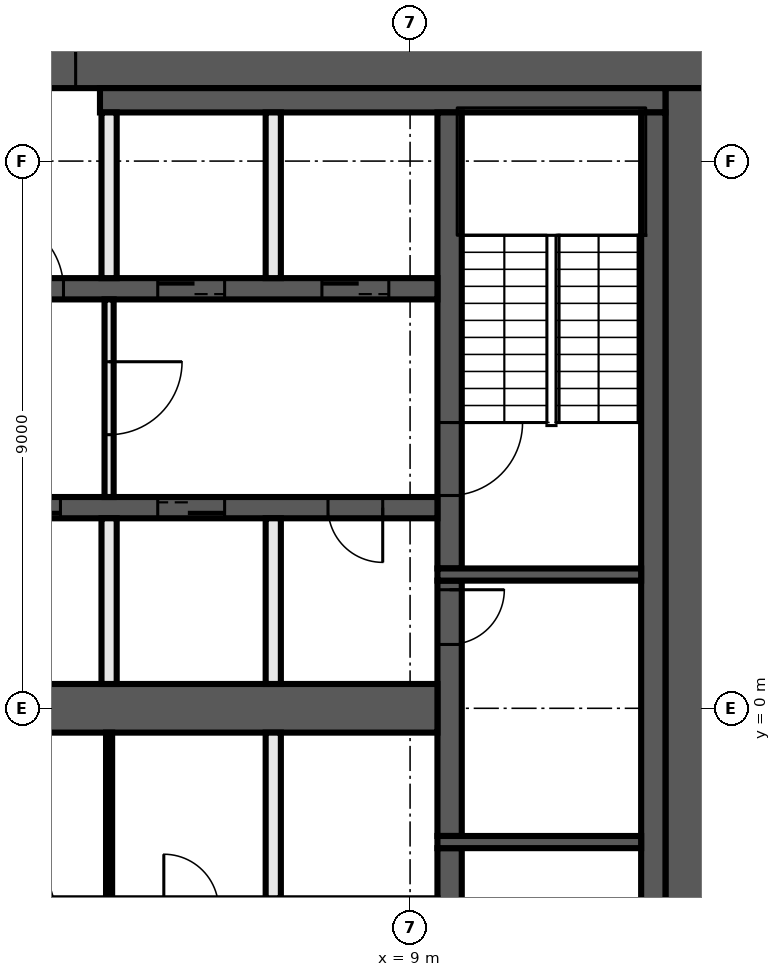
"""IFC4 building model, lengths in metres.
Left out: names, types, materials, properties, quantities, classifications, styles, units other than length and angle.
Written with IfcOpenShell. Run it as: python <this file> out.ifc"""

import sys

from ifc_helpers import new_model, si_unit, direction, frame, frame_2d, origin, place, context, subcontext, project, spatial, rectangle, extrude, element, fill, save


model = new_model("IFC4")
c1 = context("Model", 3, precision=1e-05, world=origin(), true_north=direction((0.0, 1.0)))
c2 = subcontext(c1, "Body", "Model", "MODEL_VIEW")
j1 = project(units=[si_unit("LENGTHUNIT", "METRE"), si_unit("PLANEANGLEUNIT", "RADIAN")], contexts=[c1])
p1 = place(None, origin())
s1 = spatial("IfcSite", under=j1, at=p1, CompositionType="ELEMENT")
p2 = place(p1, origin())
s2 = spatial("IfcBuilding", under=s1, at=p2, CompositionType="ELEMENT")
p3 = place(p2, frame((0.0, 0.0, 203.0)))
s3 = spatial("IfcBuildingStorey", under=s2, at=p3, CompositionType="ELEMENT", Elevation=203.0)
p4 = place(p3, frame((-14.0, 10.6, 0.0), z_axis=(0.0, 0.0, 1.0), x_axis=(1.0, 0.0, 0.0)))
e1 = element("IfcWall", 1, at=p4, inside=s3, PredefinedType="SHEAR", context=c2, shape_type="SweptSolid", body=[
    extrude(rectangle(XDim=28.0, YDim=0.8, at=frame_2d((14.0, 0.0))), origin(), (0.0, 0.0, 1.0), 3.82),
])
p5 = place(p4, frame((15.9, 0.0, 0.0)))
e2 = element("IfcOpeningElement", 2, at=p5, cuts=e1, PredefinedType="OPENING", context=c2, shape_type="SweptSolid", body=[
    extrude(rectangle(XDim=1.6, YDim=2.1, at=frame_2d((0.8, 1.05))), frame((0.0, 0.41, 0.0), z_axis=(0.0, -1.0, 0.0), x_axis=(1.0, 0.0, 0.0)), (0.0, 0.0, 1.0), 0.82),
])
p6 = place(p3, frame((13.6, 10.2, 0.0), z_axis=(0.0, 0.0, 1.0), x_axis=(0.0, -1.0, 0.0)))
e3 = element("IfcWall", 3, at=p6, inside=s3, PredefinedType="SHEAR", context=c2, shape_type="SweptSolid", body=[
    extrude(rectangle(XDim=20.4, YDim=0.8, at=frame_2d((10.2, 0.0))), origin(), (0.0, 0.0, 1.0), 3.82),
])
p7 = place(p3, frame((3.9, 10.0, 0.0), z_axis=(0.0, 0.0, 1.0), x_axis=(1.0, 0.0, 0.0)))
e4 = element("IfcWall", 4, at=p7, inside=s3, PredefinedType="SHEAR", context=c2, shape_type="SweptSolid", body=[
    extrude(rectangle(XDim=9.3, YDim=0.4, at=frame_2d((4.65, 0.0))), origin(), (0.0, 0.0, 1.0), 3.82),
])
p8 = place(p3, frame((13.0, 9.8, 0.0), z_axis=(0.0, 0.0, 1.0), x_axis=(0.0, -1.0, 0.0)))
e5 = element("IfcWall", 5, at=p8, inside=s3, PredefinedType="SHEAR", context=c2, shape_type="SweptSolid", body=[
    extrude(rectangle(XDim=19.6, YDim=0.4, at=frame_2d((9.8, 0.0))), origin(), (0.0, 0.0, 1.0), 3.82),
])
p9 = place(p3, frame((9.65, -2.3, 0.0), z_axis=(0.0, 0.0, 1.0), x_axis=(0.0, -1.0, 0.0)))
e6 = element("IfcWall", 6, at=p9, inside=s3, PredefinedType="SHEAR", context=c2, shape_type="SweptSolid", body=[
    extrude(rectangle(XDim=7.5, YDim=0.4, at=frame_2d((3.75, 0.0))), origin(), (0.0, 0.0, 1.0), 3.82),
])
p10 = place(p9, frame((1.2, 0.0, 0.0)))
e7 = element("IfcOpeningElement", 7, at=p10, cuts=e6, PredefinedType="OPENING", context=c2, shape_type="SweptSolid", body=[
    extrude(rectangle(XDim=1.2, YDim=2.1, at=frame_2d((0.6, 1.05))), frame((0.0, 0.21, 0.0), z_axis=(0.0, -1.0, 0.0), x_axis=(1.0, 0.0, 0.0)), (0.0, 0.0, 1.0), 0.42),
])
p11 = place(p3, frame((9.65, 2.1, 0.0), z_axis=(0.0, 0.0, 1.0), x_axis=(0.0, -1.0, 0.0)))
e8 = element("IfcWall", 8, at=p11, inside=s3, PredefinedType="SHEAR", context=c2, shape_type="SweptSolid", body=[
    extrude(rectangle(XDim=4.2, YDim=0.4, at=frame_2d((2.1, 0.0))), origin(), (0.0, 0.0, 1.0), 3.82),
])
p12 = place(p11, frame((0.15, 0.0, 0.0)))
e9 = element("IfcOpeningElement", 9, at=p12, cuts=e8, PredefinedType="OPENING", context=c2, shape_type="SweptSolid", body=[
    extrude(rectangle(XDim=0.9, YDim=2.1, at=frame_2d((0.45, 1.05))), frame((0.0, 0.21, 0.0), z_axis=(0.0, -1.0, 0.0), x_axis=(1.0, 0.0, 0.0)), (0.0, 0.0, 1.0), 0.42),
])
p13 = place(p3, frame((9.65, 9.8, 0.0), z_axis=(0.0, 0.0, 1.0), x_axis=(0.0, -1.0, 0.0)))
e10 = element("IfcWall", 10, at=p13, inside=s3, PredefinedType="SHEAR", context=c2, shape_type="SweptSolid", body=[
    extrude(rectangle(XDim=7.5, YDim=0.4, at=frame_2d((3.75, 0.0))), origin(), (0.0, 0.0, 1.0), 3.82),
])
p14 = place(p13, frame((5.1, 0.0, 0.0)))
e11 = element("IfcOpeningElement", 11, at=p14, cuts=e10, PredefinedType="OPENING", context=c2, shape_type="SweptSolid", body=[
    extrude(rectangle(XDim=1.2, YDim=2.1, at=frame_2d((0.6, 1.05))), frame((0.0, 0.21, 0.0), z_axis=(0.0, -1.0, 0.0), x_axis=(1.0, 0.0, 0.0)), (0.0, 0.0, 1.0), 0.42),
])
for number, where, z_axis, x_axis in (
    (12, (9.45, 2.2, 0.0), (0.0, 0.0, 1.0), (1.0, 0.0, 0.0)),
    (13, (9.45, -2.2, 0.0), (0.0, 0.0, 1.0), (1.0, 0.0, 0.0)),
):
    element("IfcWall", number, at=place(p3, frame(where, z_axis=z_axis, x_axis=x_axis)), inside=s3, PredefinedType="SHEAR", context=c2, shape_type="SweptSolid", body=[
        extrude(rectangle(XDim=3.35, YDim=0.2, at=frame_2d((1.675, 0.0))), origin(), (0.0, 0.0, 1.0), 3.82),
    ])
p15 = place(p3, frame((-9.45, 6.9, 0.0), z_axis=(0.0, 0.0, 1.0), x_axis=(1.0, 0.0, 0.0)))
e14 = element("IfcWall", 14, at=p15, inside=s3, PredefinedType="SHEAR", context=c2, shape_type="SweptSolid", body=[
    extrude(rectangle(XDim=18.9, YDim=0.35, at=frame_2d((9.45, 0.0))), origin(), (0.0, 0.0, 1.0), 3.82),
])
p16 = place(p15, frame((11.55, 0.0, 0.0)))
e15 = element("IfcOpeningElement", 15, at=p16, cuts=e14, PredefinedType="OPENING", context=c2, shape_type="SweptSolid", body=[
    extrude(rectangle(XDim=1.2, YDim=2.1, at=frame_2d((0.6, 1.05))), frame((0.0, 0.185, 0.0), z_axis=(0.0, -1.0, 0.0), x_axis=(1.0, 0.0, 0.0)), (0.0, 0.0, 1.0), 0.37),
])
p17 = place(p15, frame((14.3, 0.0, 0.0)))
e16 = element("IfcOpeningElement", 16, at=p17, cuts=e14, PredefinedType="OPENING", context=c2, shape_type="SweptSolid", body=[
    extrude(rectangle(XDim=1.1, YDim=2.1, at=frame_2d((0.55, 1.05))), frame((0.0, 0.185, 0.0), z_axis=(0.0, -1.0, 0.0), x_axis=(1.0, 0.0, 0.0)), (0.0, 0.0, 1.0), 0.37),
])
p18 = place(p15, frame((17.0, 0.0, 0.0)))
e17 = element("IfcOpeningElement", 17, at=p18, cuts=e14, PredefinedType="OPENING", context=c2, shape_type="SweptSolid", body=[
    extrude(rectangle(XDim=1.1, YDim=2.1, at=frame_2d((0.55, 1.05))), frame((0.0, 0.185, 0.0), z_axis=(0.0, -1.0, 0.0), x_axis=(1.0, 0.0, 0.0)), (0.0, 0.0, 1.0), 0.37),
])
p19 = place(p15, frame((0.9, 0.0, 0.0)))
e18 = element("IfcOpeningElement", 18, at=p19, cuts=e14, PredefinedType="OPENING", context=c2, shape_type="SweptSolid", body=[
    extrude(rectangle(XDim=0.9, YDim=2.1, at=frame_2d((0.45, 1.05))), frame((0.0, 0.185, 0.0), z_axis=(0.0, -1.0, 0.0), x_axis=(1.0, 0.0, 0.0)), (0.0, 0.0, 1.0), 0.37),
])
p20 = place(p15, frame((4.95, 0.0, 0.0)))
e19 = element("IfcOpeningElement", 19, at=p20, cuts=e14, PredefinedType="OPENING", context=c2, shape_type="SweptSolid", body=[
    extrude(rectangle(XDim=0.9, YDim=2.1, at=frame_2d((0.45, 1.05))), frame((0.0, 0.185, 0.0), z_axis=(0.0, -1.0, 0.0), x_axis=(1.0, 0.0, 0.0)), (0.0, 0.0, 1.0), 0.37),
])
p21 = place(p15, frame((9.0, 0.0, 0.0)))
e20 = element("IfcOpeningElement", 20, at=p21, cuts=e14, PredefinedType="OPENING", context=c2, shape_type="SweptSolid", body=[
    extrude(rectangle(XDim=0.9, YDim=2.1, at=frame_2d((0.45, 1.05))), frame((0.0, 0.185, 0.0), z_axis=(0.0, -1.0, 0.0), x_axis=(1.0, 0.0, 0.0)), (0.0, 0.0, 1.0), 0.37),
])
p22 = place(p3, frame((9.45, 3.3, 0.0), z_axis=(0.0, 0.0, 1.0), x_axis=(-1.0, 0.0, 0.0)))
e21 = element("IfcWall", 21, at=p22, inside=s3, PredefinedType="SHEAR", context=c2, shape_type="SweptSolid", body=[
    extrude(rectangle(XDim=18.9, YDim=0.35, at=frame_2d((9.45, 0.0))), origin(), (0.0, 0.0, 1.0), 3.82),
])
p23 = place(p22, frame((6.2, 0.0, 0.0)))
e22 = element("IfcOpeningElement", 22, at=p23, cuts=e21, PredefinedType="OPENING", context=c2, shape_type="SweptSolid", body=[
    extrude(rectangle(XDim=1.1, YDim=2.1, at=frame_2d((0.55, 1.05))), frame((0.0, 0.185, 0.0), z_axis=(0.0, -1.0, 0.0), x_axis=(1.0, 0.0, 0.0)), (0.0, 0.0, 1.0), 0.37),
])
p24 = place(p22, frame((3.5, 0.0, 0.0)))
e23 = element("IfcOpeningElement", 23, at=p24, cuts=e21, PredefinedType="OPENING", context=c2, shape_type="SweptSolid", body=[
    extrude(rectangle(XDim=1.1, YDim=2.1, at=frame_2d((0.55, 1.05))), frame((0.0, 0.185, 0.0), z_axis=(0.0, -1.0, 0.0), x_axis=(1.0, 0.0, 0.0)), (0.0, 0.0, 1.0), 0.37),
])
p25 = place(p22, frame((0.9, 0.0, 0.0)))
e24 = element("IfcOpeningElement", 24, at=p25, cuts=e21, PredefinedType="OPENING", context=c2, shape_type="SweptSolid", body=[
    extrude(rectangle(XDim=0.9, YDim=2.1, at=frame_2d((0.45, 1.05))), frame((0.0, 0.185, 0.0), z_axis=(0.0, -1.0, 0.0), x_axis=(1.0, 0.0, 0.0)), (0.0, 0.0, 1.0), 0.37),
])
p26 = place(p22, frame((15.75, 0.0, 0.0)))
e25 = element("IfcOpeningElement", 25, at=p26, cuts=e21, PredefinedType="OPENING", context=c2, shape_type="SweptSolid", body=[
    extrude(rectangle(XDim=0.9, YDim=2.1, at=frame_2d((0.45, 1.05))), frame((0.0, 0.185, 0.0), z_axis=(0.0, -1.0, 0.0), x_axis=(1.0, 0.0, 0.0)), (0.0, 0.0, 1.0), 0.37),
])
p27 = place(p22, frame((10.35, 0.0, 0.0)))
e26 = element("IfcOpeningElement", 26, at=p27, cuts=e21, PredefinedType="OPENING", context=c2, shape_type="SweptSolid", body=[
    extrude(rectangle(XDim=0.9, YDim=2.1, at=frame_2d((0.45, 1.05))), frame((0.0, 0.185, 0.0), z_axis=(0.0, -1.0, 0.0), x_axis=(1.0, 0.0, 0.0)), (0.0, 0.0, 1.0), 0.37),
])
p28 = place(p3, frame((-9.45, 0.0, 0.0), z_axis=(0.0, 0.0, 1.0), x_axis=(1.0, 0.0, 0.0)))
e27 = element("IfcWall", 27, at=p28, inside=s3, PredefinedType="SHEAR", context=c2, shape_type="SweptSolid", body=[
    extrude(rectangle(XDim=18.9, YDim=0.8, at=frame_2d((9.45, 0.0))), origin(), (0.0, 0.0, 1.0), 3.82),
])
for number, where, z_axis, x_axis in (
    (28, (6.75, -3.125, 0.0), (0.0, 0.0, 1.0), (0.0, 1.0, 0.0)),
    (29, (6.75, 0.4, 0.0), (0.0, 0.0, 1.0), (0.0, 1.0, 0.0)),
    (30, (6.75, 7.075, 0.0), (0.0, 0.0, 1.0), (0.0, 1.0, 0.0)),
):
    element("IfcWall", number, at=place(p3, frame(where, z_axis=z_axis, x_axis=x_axis)), inside=s3, PredefinedType="SOLIDWALL", context=c2, shape_type="SweptSolid", body=[
        extrude(rectangle(XDim=2.725, YDim=0.25, at=frame_2d((1.363, 0.0))), origin(), (0.0, 0.0, 1.0), 3.82),
    ])
p29 = place(p3, frame((4.05, 6.725, 0.0), z_axis=(0.0, 0.0, 1.0), x_axis=(0.0, -1.0, 0.0)))
e31 = element("IfcWall", 31, at=p29, inside=s3, PredefinedType="PARTITIONING", context=c2, shape_type="SweptSolid", body=[
    extrude(rectangle(XDim=3.25, YDim=0.15, at=frame_2d((1.625, 0.0))), origin(), (0.0, 0.0, 1.0), 3.82),
])
p30 = place(p29, frame((1.025, 0.0, 0.0)))
e32 = element("IfcOpeningElement", 32, at=p30, cuts=e31, PredefinedType="OPENING", context=c2, shape_type="SweptSolid", body=[
    extrude(rectangle(XDim=1.2, YDim=2.1, at=frame_2d((0.6, 1.05))), frame((0.0, 0.085, 0.0), z_axis=(0.0, -1.0, 0.0), x_axis=(1.0, 0.0, 0.0)), (0.0, 0.0, 1.0), 0.17),
])
p31 = place(p3, frame((4.05, -3.125, 0.0), z_axis=(0.0, 0.0, 1.0), x_axis=(0.0, 1.0, 0.0)))
e33 = element("IfcWall", 33, at=p31, inside=s3, PredefinedType="PARTITIONING", context=c2, shape_type="SweptSolid", body=[
    extrude(rectangle(XDim=2.725, YDim=0.1, at=frame_2d((1.363, 0.0))), origin(), (0.0, 0.0, 1.0), 3.82),
])
for number, where, z_axis, x_axis in (
    (34, (4.05, 0.4, 0.0), (0.0, 0.0, 1.0), (0.0, 1.0, 0.0)),
    (35, (4.05, 7.075, 0.0), (0.0, 0.0, 1.0), (0.0, 1.0, 0.0)),
):
    element("IfcWall", number, at=place(p3, frame(where, z_axis=z_axis, x_axis=x_axis)), inside=s3, PredefinedType="SOLIDWALL", context=c2, shape_type="SweptSolid", body=[
        extrude(rectangle(XDim=2.725, YDim=0.25, at=frame_2d((1.363, 0.0))), origin(), (0.0, 0.0, 1.0), 3.82),
    ])
p32 = place(p12, origin())
e36 = element("IfcDoor", 36, at=p32, inside=s3, OperationType="SINGLE_SWING_RIGHT", PredefinedType="DOOR", context=c2, shape_type="SweptSolid", body=[
    extrude(rectangle(XDim=0.9, YDim=2.1, at=frame_2d((0.45, 1.05))), frame((0.0, 0.025, 0.0), z_axis=(0.0, -1.0, 0.0), x_axis=(1.0, 0.0, 0.0)), (0.0, 0.0, 1.0), 0.05),
])
fill(e9, e36)
p33 = place(p5, origin())
e37 = element("IfcDoor", 37, at=p33, inside=s3, OperationType="DOUBLE_DOOR_SINGLE_SWING", PredefinedType="DOOR", context=c2, shape_type="SweptSolid", body=[
    extrude(rectangle(XDim=1.6, YDim=2.1, at=frame_2d((0.8, 1.05))), frame((0.0, 0.025, 0.0), z_axis=(0.0, -1.0, 0.0), x_axis=(1.0, 0.0, 0.0)), (0.0, 0.0, 1.0), 0.05),
])
fill(e2, e37)
p34 = place(p16, origin())
e38 = element("IfcDoor", 38, at=p34, inside=s3, OperationType="SINGLE_SWING_LEFT", PredefinedType="DOOR", context=c2, shape_type="SweptSolid", body=[
    extrude(rectangle(XDim=1.2, YDim=2.1, at=frame_2d((0.6, 1.05))), frame((0.0, 0.025, 0.0), z_axis=(0.0, -1.0, 0.0), x_axis=(1.0, 0.0, 0.0)), (0.0, 0.0, 1.0), 0.05),
])
fill(e15, e38)
p35 = place(p17, origin())
e39 = element("IfcDoor", 39, at=p35, inside=s3, OperationType="DOUBLE_DOOR_SLIDING", PredefinedType="DOOR", context=c2, shape_type="SweptSolid", body=[
    extrude(rectangle(XDim=1.1, YDim=2.1, at=frame_2d((0.55, 1.05))), frame((0.0, 0.025, 0.0), z_axis=(0.0, -1.0, 0.0), x_axis=(1.0, 0.0, 0.0)), (0.0, 0.0, 1.0), 0.05),
])
fill(e16, e39)
p36 = place(p18, origin())
e40 = element("IfcDoor", 40, at=p36, inside=s3, OperationType="DOUBLE_DOOR_SLIDING", PredefinedType="DOOR", context=c2, shape_type="SweptSolid", body=[
    extrude(rectangle(XDim=1.1, YDim=2.1, at=frame_2d((0.55, 1.05))), frame((0.0, 0.025, 0.0), z_axis=(0.0, -1.0, 0.0), x_axis=(1.0, 0.0, 0.0)), (0.0, 0.0, 1.0), 0.05),
])
fill(e17, e40)
p37 = place(p23, origin())
e41 = element("IfcDoor", 41, at=p37, inside=s3, OperationType="DOUBLE_DOOR_SLIDING", PredefinedType="DOOR", context=c2, shape_type="SweptSolid", body=[
    extrude(rectangle(XDim=1.1, YDim=2.1, at=frame_2d((0.55, 1.05))), frame((0.0, 0.025, 0.0), z_axis=(0.0, -1.0, 0.0), x_axis=(1.0, 0.0, 0.0)), (0.0, 0.0, 1.0), 0.05),
])
fill(e22, e41)
p38 = place(p24, origin())
e42 = element("IfcDoor", 42, at=p38, inside=s3, OperationType="DOUBLE_DOOR_SLIDING", PredefinedType="DOOR", context=c2, shape_type="SweptSolid", body=[
    extrude(rectangle(XDim=1.1, YDim=2.1, at=frame_2d((0.55, 1.05))), frame((0.0, 0.025, 0.0), z_axis=(0.0, -1.0, 0.0), x_axis=(1.0, 0.0, 0.0)), (0.0, 0.0, 1.0), 0.05),
])
fill(e23, e42)
p39 = place(p25, origin())
e43 = element("IfcDoor", 43, at=p39, inside=s3, OperationType="SINGLE_SWING_LEFT", PredefinedType="DOOR", context=c2, shape_type="SweptSolid", body=[
    extrude(rectangle(XDim=0.9, YDim=2.1, at=frame_2d((0.45, 1.05))), frame((0.0, 0.025, 0.0), z_axis=(0.0, -1.0, 0.0), x_axis=(1.0, 0.0, 0.0)), (0.0, 0.0, 1.0), 0.05),
])
fill(e24, e43)
p40 = place(p14, origin())
e44 = element("IfcDoor", 44, at=p40, inside=s3, OperationType="SINGLE_SWING_LEFT", PredefinedType="DOOR", context=c2, shape_type="SweptSolid", body=[
    extrude(rectangle(XDim=1.2, YDim=2.1, at=frame_2d((0.6, 1.05))), frame((0.0, 0.025, 0.0), z_axis=(0.0, -1.0, 0.0), x_axis=(1.0, 0.0, 0.0)), (0.0, 0.0, 1.0), 0.05),
])
fill(e11, e44)
p41 = place(p30, origin())
e45 = element("IfcDoor", 45, at=p41, inside=s3, OperationType="SINGLE_SWING_RIGHT", PredefinedType="DOOR", context=c2, shape_type="SweptSolid", body=[
    extrude(rectangle(XDim=1.2, YDim=2.1, at=frame_2d((0.6, 1.05))), frame((0.0, 0.025, 0.0), z_axis=(0.0, -1.0, 0.0), x_axis=(1.0, 0.0, 0.0)), (0.0, 0.0, 1.0), 0.05),
])
fill(e32, e45)
save(model, sys.argv[1])
